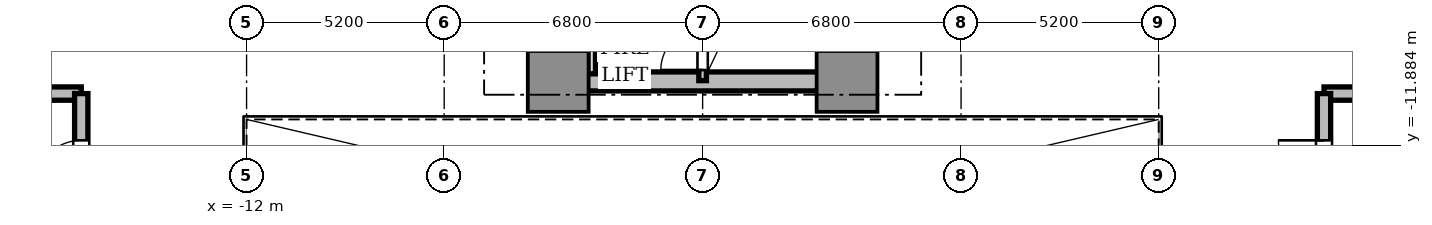
"""IFC4 building model, lengths in metres.
Left out: names, types, materials, properties, quantities, classifications, styles, units other than length and angle.
Written with IfcOpenShell. Run it as: python <this file> out.ifc"""

import sys

from ifc_helpers import new_model, si_unit, direction, frame, frame_2d, origin, origin_2d, place, context, subcontext, project, spatial, rectangle, extrude, source, transform, mapped, element, fill, save


model = new_model("IFC4")
c1 = context("Model", 3, precision=1e-05, world=origin(), true_north=direction((0.0, 1.0)))
c2 = subcontext(c1, "Body", "Model", "MODEL_VIEW")
j1 = project(units=[si_unit("LENGTHUNIT", "METRE"), si_unit("PLANEANGLEUNIT", "RADIAN")], contexts=[c1])
p1 = place(None, origin())
s1 = spatial("IfcSite", under=j1, at=p1, CompositionType="ELEMENT")
p2 = place(p1, origin())
s2 = spatial("IfcBuilding", under=s1, at=p2, CompositionType="ELEMENT")
p3 = place(p2, frame((0.0, 0.0, 4.8)))
s3 = spatial("IfcBuildingStorey", under=s2, at=p3, CompositionType="ELEMENT", Elevation=4.8)
p4 = place(p3, frame((-3.55, -10.2, 0.0), z_axis=(0.0, 0.0, 1.0), x_axis=(1.0, 0.0, 0.0)))
e1 = element("IfcWall", 1, at=p4, inside=s3, PredefinedType="SHEAR", context=c2, shape_type="SweptSolid", body=[
    extrude(rectangle(XDim=7.1, YDim=0.5, at=frame_2d((3.55, 0.0))), origin(), (0.0, 0.0, 1.0), 4.1),
])
p5 = place(p3, frame((3.8, -9.75, 0.0), z_axis=(0.0, 0.0, 1.0), x_axis=(0.0, 1.0, 0.0)))
e2 = element("IfcWall", 2, at=p5, inside=s3, PredefinedType="SHEAR", context=c2, shape_type="SweptSolid", body=[
    extrude(rectangle(XDim=6.9, YDim=0.5, at=frame_2d((3.45, 0.0))), origin(), (0.0, 0.0, 1.0), 4.1),
])
m1 = source(origin(), c2, "Body", "SweptSolid", [
    extrude(rectangle(XDim=1.6, YDim=1.6, at=origin_2d()), origin(), (0.0, 0.0, 1.0), 4.1),
])
for number, where, z_axis, x_axis in (
    (3, (-3.8, -10.2, 0.0), (0.0, 0.0, 1.0), (1.0, 0.0, 0.0)),
    (4, (3.8, -10.2, 0.0), (0.0, 0.0, 1.0), (1.0, 0.0, 0.0)),
):
    element("IfcColumn", number, at=place(p3, frame(where, z_axis=z_axis, x_axis=x_axis)), inside=s3, PredefinedType="COLUMN", context=c2, shape_type="MappedRepresentation", body=[
        mapped(m1, transform((0.0, 0.0, 0.0), scale=1.0)),
    ])
p6 = place(p3, frame((0.0, -10.18, 0.0), z_axis=(0.0, 0.0, 1.0), x_axis=(0.0, 1.0, 0.0)))
e5 = element("IfcWall", 5, at=p6, inside=s3, PredefinedType="SOLIDWALL", context=c2, shape_type="SweptSolid", body=[
    extrude(rectangle(XDim=7.68, YDim=0.2, at=frame_2d((3.84, 0.0))), origin(), (0.0, 0.0, 1.0), 4.1),
])
p7 = place(p6, frame((0.28, 0.0, 0.0)))
e6 = element("IfcOpeningElement", 6, at=p7, cuts=e5, PredefinedType="OPENING", context=c2, shape_type="SweptSolid", body=[
    extrude(rectangle(XDim=1.1, YDim=2.15, at=frame_2d((0.55, 1.075))), frame((0.0, 0.11, 0.0), z_axis=(0.0, -1.0, 0.0), x_axis=(1.0, 0.0, 0.0)), (0.0, 0.0, 1.0), 0.22),
])
p8 = place(p3, frame((-2.92, -10.0, 0.0), z_axis=(0.0, 0.0, 1.0), x_axis=(0.0, 1.0, 0.0)))
e7 = element("IfcWall", 7, at=p8, inside=s3, PredefinedType="SOLIDWALL", context=c2, shape_type="SweptSolid", body=[
    extrude(rectangle(XDim=1.44, YDim=0.2, at=frame_2d((0.72, 0.0))), origin(), (0.0, 0.0, 1.0), 3.65),
])
p9 = place(p3, frame((-26.6, -10.52, 0.0), z_axis=(0.0, 0.0, 1.0), x_axis=(1.0, 0.0, 0.0)))
e8 = element("IfcWall", 8, at=p9, inside=s3, PredefinedType="SHEAR", context=c2, shape_type="SweptSolid", body=[
    extrude(rectangle(XDim=10.25, YDim=0.35, at=frame_2d((5.125, 0.0))), origin(), (0.0, 0.0, 1.0), 4.1),
])
p10 = place(p3, frame((-16.35, -14.1, 0.0), z_axis=(0.0, 0.0, 1.0), x_axis=(0.0, 1.0, 0.0)))
e9 = element("IfcWall", 9, at=p10, inside=s3, PredefinedType="SHEAR", context=c2, shape_type="SweptSolid", body=[
    extrude(rectangle(XDim=3.58, YDim=0.35, at=frame_2d((1.79, 0.0))), origin(), (0.0, 0.0, 1.0), 4.1),
])
p11 = place(p10, frame((1.15, 0.0, 0.0)))
e10 = element("IfcOpeningElement", 10, at=p11, cuts=e9, PredefinedType="OPENING", context=c2, shape_type="SweptSolid", body=[
    extrude(rectangle(XDim=1.2, YDim=2.2, at=frame_2d((0.6, 1.1))), frame((0.0, 0.185, 0.0), z_axis=(0.0, -1.0, 0.0), x_axis=(1.0, 0.0, 0.0)), (0.0, 0.0, 1.0), 0.37),
])
p12 = place(p3, frame((16.35, -10.52, 0.0), z_axis=(0.0, 0.0, 1.0), x_axis=(1.0, 0.0, 0.0)))
e11 = element("IfcWall", 11, at=p12, inside=s3, PredefinedType="SHEAR", context=c2, shape_type="SweptSolid", body=[
    extrude(rectangle(XDim=10.25, YDim=0.35, at=frame_2d((5.125, 0.0))), origin(), (0.0, 0.0, 1.0), 4.1),
])
p13 = place(p3, frame((16.35, -14.1, 0.0), z_axis=(0.0, 0.0, 1.0), x_axis=(0.0, 1.0, 0.0)))
e12 = element("IfcWall", 12, at=p13, inside=s3, PredefinedType="SHEAR", context=c2, shape_type="SweptSolid", body=[
    extrude(rectangle(XDim=3.58, YDim=0.35, at=frame_2d((1.79, 0.0))), origin(), (0.0, 0.0, 1.0), 4.1),
])
p14 = place(p13, frame((1.15, 0.0, 0.0)))
e13 = element("IfcOpeningElement", 13, at=p14, cuts=e12, PredefinedType="OPENING", context=c2, shape_type="SweptSolid", body=[
    extrude(rectangle(XDim=1.2, YDim=2.2, at=frame_2d((0.6, 1.1))), frame((0.0, 0.185, 0.0), z_axis=(0.0, -1.0, 0.0), x_axis=(1.0, 0.0, 0.0)), (0.0, 0.0, 1.0), 0.37),
])
m2 = source(origin(), c2, "Body", "SweptSolid", [
    extrude(rectangle(XDim=1.1, YDim=0.05, at=origin_2d()), origin(), (0.0, 0.0, 1.0), 2.15),
])
p15 = place(p7, frame((0.55, 0.0, 0.0)))
e14 = element("IfcDoor", 14, at=p15, inside=s3, OperationType="SINGLE_SWING_LEFT", PredefinedType="DOOR", context=c2, shape_type="MappedRepresentation", body=[
    mapped(m2, transform((0.0, 0.0, 0.0), scale=1.0)),
])
fill(e6, e14)
m3 = source(origin(), c2, "Body", "SweptSolid", [
    extrude(rectangle(XDim=1.2, YDim=0.05, at=origin_2d()), origin(), (0.0, 0.0, 1.0), 2.2),
])
p16 = place(p11, frame((0.6, 0.0, 0.0)))
e15 = element("IfcDoor", 15, at=p16, inside=s3, OperationType="SINGLE_SWING_LEFT", PredefinedType="DOOR", context=c2, shape_type="MappedRepresentation", body=[
    mapped(m3, transform((0.0, 0.0, 0.0), scale=1.0)),
])
fill(e10, e15)
p17 = place(p14, frame((0.6, 0.0, 0.0)))
e16 = element("IfcDoor", 16, at=p17, inside=s3, OperationType="SINGLE_SWING_RIGHT", PredefinedType="DOOR", context=c2, shape_type="MappedRepresentation", body=[
    mapped(m3, transform((0.0, 0.0, 0.0), scale=1.0)),
])
fill(e13, e16)
save(model, sys.argv[1])
